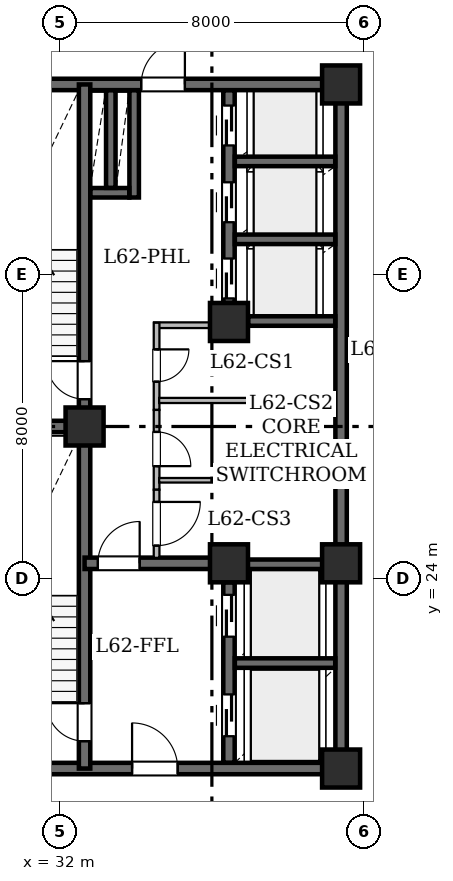
"""IFC4 building model, lengths in metres.
Left out: names, types, materials, properties, quantities, classifications, styles, units other than length and angle.
Written with IfcOpenShell. Run it as: python <this file> out.ifc"""

import sys

from ifc_helpers import new_model, si_unit, direction, frame, frame_2d, origin, origin_2d, place, context, subcontext, project, spatial, rectangle, hollow_rectangle, extrude, element, fill, save


model = new_model("IFC4")
c1 = context("Model", 3, precision=1e-05, world=origin(), true_north=direction((0.0, 1.0)))
c2 = subcontext(c1, "Body", "Model", "MODEL_VIEW")
j1 = project(units=[si_unit("LENGTHUNIT", "METRE"), si_unit("PLANEANGLEUNIT", "RADIAN")], contexts=[c1])
p1 = place(None, origin())
s1 = spatial("IfcSite", under=j1, at=p1, CompositionType="ELEMENT")
p2 = place(p1, origin())
s2 = spatial("IfcBuilding", under=s1, at=p2, CompositionType="ELEMENT")
p3 = place(p2, frame((0.0, 0.0, 242.75)))
s3 = spatial("IfcBuildingStorey", under=s2, at=p3, CompositionType="ELEMENT", Elevation=242.75)
for number, where, z_axis, x_axis in (
    (1, (32.65, 28.0, 0.0), (0.0, 0.0, 1.0), (1.0, 0.0, 0.0)),
    (2, (39.4, 19.0, 0.0), (0.0, 0.0, 1.0), (1.0, 0.0, 0.0)),
    (3, (36.45, 24.4, 0.0), (0.0, 0.0, 1.0), (1.0, 0.0, 0.0)),
    (4, (39.4, 24.4, 0.0), (0.0, 0.0, 1.0), (1.0, 0.0, 0.0)),
    (5, (36.45, 30.75, 0.0), (0.0, 0.0, 1.0), (1.0, 0.0, 0.0)),
    (6, (39.4, 37.0, 0.0), (0.0, 0.0, 1.0), (1.0, 0.0, 0.0)),
):
    element("IfcColumn", number, at=place(p3, frame(where, z_axis=z_axis, x_axis=x_axis)), inside=s3, PredefinedType="COLUMN", context=c2, shape_type="SweptSolid", body=[
        extrude(hollow_rectangle(XDim=1.0, YDim=1.0, WallThickness=0.05, at=origin_2d()), origin(), (0.0, 0.0, 1.0), 3.65),
    ])
p4 = place(p3, frame((29.0, 19.0, 0.0), z_axis=(0.0, 0.0, 1.0), x_axis=(1.0, 0.0, 0.0)))
e7 = element("IfcWall", 7, at=p4, inside=s3, PredefinedType="SHEAR", context=c2, shape_type="SweptSolid", body=[
    extrude(rectangle(XDim=10.4, YDim=0.3, at=frame_2d((5.2, 0.0))), origin(), (0.0, 0.0, 1.0), 3.43),
])
p5 = place(p4, frame((4.9, 0.0, 0.0)))
e8 = element("IfcOpeningElement", 8, at=p5, cuts=e7, PredefinedType="OPENING", context=c2, shape_type="SweptSolid", body=[
    extrude(rectangle(XDim=1.2, YDim=2.15, at=frame_2d((0.6, 1.075))), frame((0.0, 0.16, 0.0), z_axis=(0.0, -1.0, 0.0), x_axis=(1.0, 0.0, 0.0)), (0.0, 0.0, 1.0), 0.32),
])
p6 = place(p3, frame((29.0, 37.0, 0.0), z_axis=(0.0, 0.0, 1.0), x_axis=(1.0, 0.0, 0.0)))
e9 = element("IfcWall", 9, at=p6, inside=s3, PredefinedType="SHEAR", context=c2, shape_type="SweptSolid", body=[
    extrude(rectangle(XDim=10.4, YDim=0.3, at=frame_2d((5.2, 0.0))), origin(), (0.0, 0.0, 1.0), 3.43),
])
p7 = place(p6, frame((5.14, 0.0, 0.0)))
e10 = element("IfcOpeningElement", 10, at=p7, cuts=e9, PredefinedType="OPENING", context=c2, shape_type="SweptSolid", body=[
    extrude(rectangle(XDim=1.15, YDim=2.2, at=frame_2d((0.575, 1.1))), frame((0.0, 0.16, 0.0), z_axis=(0.0, -1.0, 0.0), x_axis=(1.0, 0.0, 0.0)), (0.0, 0.0, 1.0), 0.32),
])
p8 = place(p3, frame((39.4, 19.0, 0.0), z_axis=(0.0, 0.0, 1.0), x_axis=(0.0, 1.0, 0.0)))
e11 = element("IfcWall", 11, at=p8, inside=s3, PredefinedType="SHEAR", context=c2, shape_type="SweptSolid", body=[
    extrude(rectangle(XDim=5.4, YDim=0.3, at=frame_2d((2.7, 0.0))), origin(), (0.0, 0.0, 1.0), 3.43),
])
p9 = place(p3, frame((39.4, 24.4, 0.0), z_axis=(0.0, 0.0, 1.0), x_axis=(0.0, 1.0, 0.0)))
e12 = element("IfcWall", 12, at=p9, inside=s3, PredefinedType="SHEAR", context=c2, shape_type="SweptSolid", body=[
    extrude(rectangle(XDim=12.6, YDim=0.3, at=frame_2d((6.3, 0.0))), origin(), (0.0, 0.0, 1.0), 3.43),
])
p10 = place(p3, frame((32.65, 19.0, 0.0), z_axis=(0.0, 0.0, 1.0), x_axis=(0.0, 1.0, 0.0)))
e13 = element("IfcWall", 13, at=p10, inside=s3, PredefinedType="SHEAR", context=c2, shape_type="SweptSolid", body=[
    extrude(rectangle(XDim=9.0, YDim=0.3, at=frame_2d((4.5, 0.0))), origin(), (0.0, 0.0, 1.0), 3.43),
])
p11 = place(p10, frame((0.72, 0.0, 0.0)))
e14 = element("IfcOpeningElement", 14, at=p11, cuts=e13, PredefinedType="OPENING", context=c2, shape_type="SweptSolid", body=[
    extrude(rectangle(XDim=1.0, YDim=2.15, at=frame_2d((0.5, 1.075))), frame((0.0, 0.16, 0.0), z_axis=(0.0, -1.0, 0.0), x_axis=(1.0, 0.0, 0.0)), (0.0, 0.0, 1.0), 0.32),
])
p12 = place(p3, frame((32.65, 28.0, 0.0), z_axis=(0.0, 0.0, 1.0), x_axis=(0.0, 1.0, 0.0)))
e15 = element("IfcWall", 15, at=p12, inside=s3, PredefinedType="SHEAR", context=c2, shape_type="SweptSolid", body=[
    extrude(rectangle(XDim=9.0, YDim=0.3, at=frame_2d((4.5, 0.0))), origin(), (0.0, 0.0, 1.0), 3.43),
])
p13 = place(p12, frame((0.72, 0.0, 0.0)))
e16 = element("IfcOpeningElement", 16, at=p13, cuts=e15, PredefinedType="OPENING", context=c2, shape_type="SweptSolid", body=[
    extrude(rectangle(XDim=1.0, YDim=2.15, at=frame_2d((0.5, 1.075))), frame((0.0, 0.16, 0.0), z_axis=(0.0, -1.0, 0.0), x_axis=(1.0, 0.0, 0.0)), (0.0, 0.0, 1.0), 0.32),
])
p14 = place(p3, frame((29.0, 28.0, 0.0), z_axis=(0.0, 0.0, 1.0), x_axis=(1.0, 0.0, 0.0)))
e17 = element("IfcWall", 17, at=p14, inside=s3, PredefinedType="SHEAR", context=c2, shape_type="SweptSolid", body=[
    extrude(rectangle(XDim=3.65, YDim=0.3, at=frame_2d((1.825, 0.0))), origin(), (0.0, 0.0, 1.0), 3.43),
])
p15 = place(p3, frame((32.65, 24.4, 0.0), z_axis=(0.0, 0.0, 1.0), x_axis=(1.0, 0.0, 0.0)))
e18 = element("IfcWall", 18, at=p15, inside=s3, PredefinedType="SHEAR", context=c2, shape_type="SweptSolid", body=[
    extrude(rectangle(XDim=3.8, YDim=0.3, at=frame_2d((1.9, 0.0))), origin(), (0.0, 0.0, 1.0), 3.43),
])
p16 = place(p15, frame((0.35, 0.0, 0.0)))
e19 = element("IfcOpeningElement", 19, at=p16, cuts=e18, PredefinedType="OPENING", context=c2, shape_type="SweptSolid", body=[
    extrude(rectangle(XDim=1.1, YDim=2.15, at=frame_2d((0.55, 1.075))), frame((0.0, 0.16, 0.0), z_axis=(0.0, -1.0, 0.0), x_axis=(1.0, 0.0, 0.0)), (0.0, 0.0, 1.0), 0.32),
])
p17 = place(p3, frame((36.45, 19.154, 0.0), z_axis=(0.0, 0.0, 1.0), x_axis=(0.0, 1.0, 0.0)))
e20 = element("IfcWall", 20, at=p17, inside=s3, PredefinedType="SHEAR", context=c2, shape_type="SweptSolid", body=[
    extrude(rectangle(XDim=4.746, YDim=0.3, at=frame_2d((2.373, 0.0))), origin(), (0.0, 0.0, 1.0), 3.43),
])
p18 = place(p17, frame((0.696, 0.0, 0.0)))
e21 = element("IfcOpeningElement", 21, at=p18, cuts=e20, PredefinedType="OPENING", context=c2, shape_type="SweptSolid", body=[
    extrude(rectangle(XDim=1.1, YDim=2.15, at=frame_2d((0.55, 1.075))), frame((0.0, 0.16, 0.0), z_axis=(0.0, -1.0, 0.0), x_axis=(1.0, 0.0, 0.0)), (0.0, 0.0, 1.0), 0.32),
])
p19 = place(p17, frame((3.316, 0.0, 0.0)))
e22 = element("IfcOpeningElement", 22, at=p19, cuts=e20, PredefinedType="OPENING", context=c2, shape_type="SweptSolid", body=[
    extrude(rectangle(XDim=1.1, YDim=2.15, at=frame_2d((0.55, 1.075))), frame((0.0, 0.16, 0.0), z_axis=(0.0, -1.0, 0.0), x_axis=(1.0, 0.0, 0.0)), (0.0, 0.0, 1.0), 0.32),
])
p20 = place(p3, frame((36.45, 31.25, 0.0), z_axis=(0.0, 0.0, 1.0), x_axis=(0.0, 1.0, 0.0)))
e23 = element("IfcWall", 23, at=p20, inside=s3, PredefinedType="SHEAR", context=c2, shape_type="SweptSolid", body=[
    extrude(rectangle(XDim=5.596, YDim=0.3, at=frame_2d((2.798, 0.0))), origin(), (0.0, 0.0, 1.0), 3.43),
])
p21 = place(p20, frame((0.12, 0.0, 0.0)))
e24 = element("IfcOpeningElement", 24, at=p21, cuts=e23, PredefinedType="OPENING", context=c2, shape_type="SweptSolid", body=[
    extrude(rectangle(XDim=1.05, YDim=2.15, at=frame_2d((0.525, 1.075))), frame((0.0, 0.16, 0.0), z_axis=(0.0, -1.0, 0.0), x_axis=(1.0, 0.0, 0.0)), (0.0, 0.0, 1.0), 0.32),
])
p22 = place(p20, frame((2.125, 0.0, 0.0)))
e25 = element("IfcOpeningElement", 25, at=p22, cuts=e23, PredefinedType="OPENING", context=c2, shape_type="SweptSolid", body=[
    extrude(rectangle(XDim=1.05, YDim=2.15, at=frame_2d((0.525, 1.075))), frame((0.0, 0.16, 0.0), z_axis=(0.0, -1.0, 0.0), x_axis=(1.0, 0.0, 0.0)), (0.0, 0.0, 1.0), 0.32),
])
p23 = place(p20, frame((4.145, 0.0, 0.0)))
e26 = element("IfcOpeningElement", 26, at=p23, cuts=e23, PredefinedType="OPENING", context=c2, shape_type="SweptSolid", body=[
    extrude(rectangle(XDim=1.05, YDim=2.15, at=frame_2d((0.525, 1.075))), frame((0.0, 0.16, 0.0), z_axis=(0.0, -1.0, 0.0), x_axis=(1.0, 0.0, 0.0)), (0.0, 0.0, 1.0), 0.32),
])
for number, where, z_axis, x_axis in (
    (27, (36.604, 21.775, 0.0), (0.0, 0.0, 1.0), (1.0, 0.0, 0.0)),
    (28, (36.604, 24.375, 0.0), (0.0, 0.0, 1.0), (1.0, 0.0, 0.0)),
):
    element("IfcWall", number, at=place(p3, frame(where, z_axis=z_axis, x_axis=x_axis)), inside=s3, PredefinedType="SHEAR", context=c2, shape_type="SweptSolid", body=[
        extrude(rectangle(XDim=2.642, YDim=0.25, at=frame_2d((1.321, 0.0))), origin(), (0.0, 0.0, 1.0), 3.43),
    ])
p24 = place(p3, frame((36.954, 30.775, 0.0), z_axis=(0.0, 0.0, 1.0), x_axis=(1.0, 0.0, 0.0)))
e29 = element("IfcWall", 29, at=p24, inside=s3, PredefinedType="SHEAR", context=c2, shape_type="SweptSolid", body=[
    extrude(rectangle(XDim=2.292, YDim=0.25, at=frame_2d((1.146, 0.0))), origin(), (0.0, 0.0, 1.0), 3.43),
])
for number, where, z_axis, x_axis in (
    (30, (36.604, 32.925, 0.0), (0.0, 0.0, 1.0), (1.0, 0.0, 0.0)),
    (31, (36.604, 34.975, 0.0), (0.0, 0.0, 1.0), (1.0, 0.0, 0.0)),
):
    element("IfcWall", number, at=place(p3, frame(where, z_axis=z_axis, x_axis=x_axis)), inside=s3, PredefinedType="SHEAR", context=c2, shape_type="SweptSolid", body=[
        extrude(rectangle(XDim=2.642, YDim=0.25, at=frame_2d((1.321, 0.0))), origin(), (0.0, 0.0, 1.0), 3.43),
    ])
p25 = place(p3, frame((33.955, 34.025, 0.0), z_axis=(0.0, 0.0, 1.0), x_axis=(0.0, 1.0, 0.0)))
e32 = element("IfcWall", 32, at=p25, inside=s3, PredefinedType="SHEAR", context=c2, shape_type="SweptSolid", body=[
    extrude(rectangle(XDim=2.821, YDim=0.25, at=frame_2d((1.411, 0.0))), origin(), (0.0, 0.0, 1.0), 3.43),
])
p26 = place(p3, frame((32.804, 34.15, 0.0), z_axis=(0.0, 0.0, 1.0), x_axis=(1.0, 0.0, 0.0)))
e33 = element("IfcWall", 33, at=p26, inside=s3, PredefinedType="SHEAR", context=c2, shape_type="SweptSolid", body=[
    extrude(rectangle(XDim=1.022, YDim=0.25, at=frame_2d((0.511, 0.0))), origin(), (0.0, 0.0, 1.0), 3.43),
])
p27 = place(p3, frame((33.34, 34.279, 0.0), z_axis=(0.0, 0.0, 1.0), x_axis=(0.0, 1.0, 0.0)))
e34 = element("IfcWall", 34, at=p27, inside=s3, PredefinedType="SHEAR", context=c2, shape_type="SweptSolid", body=[
    extrude(rectangle(XDim=2.567, YDim=0.25, at=frame_2d((1.283, 0.0))), origin(), (0.0, 0.0, 1.0), 3.43),
])
p28 = place(p3, frame((36.3, 30.665, 0.0), z_axis=(0.0, 0.0, 1.0), x_axis=(-1.0, 0.0, 0.0)))
e35 = element("IfcWall", 35, at=p28, inside=s3, PredefinedType="STANDARD", context=c2, shape_type="SweptSolid", body=[
    extrude(rectangle(XDim=1.82, YDim=0.15, at=frame_2d((0.91, 0.0))), origin(), (0.0, 0.0, 1.0), 3.43),
])
p29 = place(p3, frame((34.545, 30.73, 0.0), z_axis=(0.0, 0.0, 1.0), x_axis=(0.0, -1.0, 0.0)))
e36 = element("IfcWall", 36, at=p29, inside=s3, PredefinedType="STANDARD", context=c2, shape_type="SweptSolid", body=[
    extrude(rectangle(XDim=2.294, YDim=0.15, at=frame_2d((1.147, 0.0))), origin(), (0.0, 0.0, 1.0), 3.43),
])
p30 = place(p29, frame((0.701, 0.0, 0.0)))
e37 = element("IfcOpeningElement", 37, at=p30, cuts=e36, PredefinedType="OPENING", context=c2, shape_type="SweptSolid", body=[
    extrude(rectangle(XDim=0.85, YDim=2.1, at=frame_2d((0.425, 1.05))), frame((0.0, 0.085, 0.0), z_axis=(0.0, -1.0, 0.0), x_axis=(1.0, 0.0, 0.0)), (0.0, 0.0, 1.0), 0.17),
])
p31 = place(p3, frame((34.545, 28.436, 0.0), z_axis=(0.0, 0.0, 1.0), x_axis=(0.0, -1.0, 0.0)))
e38 = element("IfcWall", 38, at=p31, inside=s3, PredefinedType="STANDARD", context=c2, shape_type="SweptSolid", body=[
    extrude(rectangle(XDim=2.1, YDim=0.15, at=frame_2d((1.05, 0.0))), origin(), (0.0, 0.0, 1.0), 3.43),
])
p32 = place(p31, frame((0.579, 0.0, 0.0)))
e39 = element("IfcOpeningElement", 39, at=p32, cuts=e38, PredefinedType="OPENING", context=c2, shape_type="SweptSolid", body=[
    extrude(rectangle(XDim=0.9, YDim=2.1, at=frame_2d((0.45, 1.05))), frame((0.0, 0.085, 0.0), z_axis=(0.0, -1.0, 0.0), x_axis=(1.0, 0.0, 0.0)), (0.0, 0.0, 1.0), 0.17),
])
p33 = place(p3, frame((34.545, 26.336, 0.0), z_axis=(0.0, 0.0, 1.0), x_axis=(0.0, -1.0, 0.0)))
e40 = element("IfcWall", 40, at=p33, inside=s3, PredefinedType="STANDARD", context=c2, shape_type="SweptSolid", body=[
    extrude(rectangle(XDim=1.792, YDim=0.15, at=frame_2d((0.896, 0.0))), origin(), (0.0, 0.0, 1.0), 3.43),
])
p34 = place(p33, frame((0.321, 0.0, 0.0)))
e41 = element("IfcOpeningElement", 41, at=p34, cuts=e40, PredefinedType="OPENING", context=c2, shape_type="SweptSolid", body=[
    extrude(rectangle(XDim=1.15, YDim=2.2, at=frame_2d((0.575, 1.1))), frame((0.0, 0.085, 0.0), z_axis=(0.0, -1.0, 0.0), x_axis=(1.0, 0.0, 0.0)), (0.0, 0.0, 1.0), 0.17),
])
p35 = place(p3, frame((39.256, 28.685, 0.0), z_axis=(0.0, 0.0, 1.0), x_axis=(-1.0, 0.0, 0.0)))
e42 = element("IfcWall", 42, at=p35, inside=s3, PredefinedType="PARTITIONING", context=c2, shape_type="SweptSolid", body=[
    extrude(rectangle(XDim=4.644, YDim=0.135, at=frame_2d((2.322, 0.0))), origin(), (0.0, 0.0, 1.0), 3.43),
])
p36 = place(p3, frame((39.256, 26.585, 0.0), z_axis=(0.0, 0.0, 1.0), x_axis=(-1.0, 0.0, 0.0)))
e43 = element("IfcWall", 43, at=p36, inside=s3, PredefinedType="PARTITIONING", context=c2, shape_type="SweptSolid", body=[
    extrude(rectangle(XDim=4.644, YDim=0.12, at=frame_2d((2.322, 0.0))), origin(), (0.0, 0.0, 1.0), 3.43),
])
p37 = place(p11, origin())
e44 = element("IfcDoor", 44, at=p37, inside=s3, OperationType="SINGLE_SWING_RIGHT", PredefinedType="DOOR", context=c2, shape_type="SweptSolid", body=[
    extrude(rectangle(XDim=1.0, YDim=2.15, at=frame_2d((0.5, 1.075))), frame((0.0, 0.025, 0.0), z_axis=(0.0, -1.0, 0.0), x_axis=(1.0, 0.0, 0.0)), (0.0, 0.0, 1.0), 0.05),
])
fill(e14, e44)
p38 = place(p13, origin())
e45 = element("IfcDoor", 45, at=p38, inside=s3, OperationType="SINGLE_SWING_RIGHT", PredefinedType="DOOR", context=c2, shape_type="SweptSolid", body=[
    extrude(rectangle(XDim=1.0, YDim=2.15, at=frame_2d((0.5, 1.075))), frame((0.0, 0.025, 0.0), z_axis=(0.0, -1.0, 0.0), x_axis=(1.0, 0.0, 0.0)), (0.0, 0.0, 1.0), 0.05),
])
fill(e16, e45)
p39 = place(p16, origin())
e46 = element("IfcDoor", 46, at=p39, inside=s3, OperationType="SINGLE_SWING_RIGHT", PredefinedType="DOOR", context=c2, shape_type="SweptSolid", body=[
    extrude(rectangle(XDim=1.1, YDim=2.15, at=frame_2d((0.55, 1.075))), frame((0.0, 0.025, 0.0), z_axis=(0.0, -1.0, 0.0), x_axis=(1.0, 0.0, 0.0)), (0.0, 0.0, 1.0), 0.05),
])
fill(e19, e46)
p40 = place(p5, origin())
e47 = element("IfcDoor", 47, at=p40, inside=s3, OperationType="SINGLE_SWING_LEFT", PredefinedType="DOOR", context=c2, shape_type="SweptSolid", body=[
    extrude(rectangle(XDim=1.2, YDim=2.15, at=frame_2d((0.6, 1.075))), frame((0.0, 0.025, 0.0), z_axis=(0.0, -1.0, 0.0), x_axis=(1.0, 0.0, 0.0)), (0.0, 0.0, 1.0), 0.05),
])
fill(e8, e47)
p41 = place(p7, origin())
e48 = element("IfcDoor", 48, at=p41, inside=s3, OperationType="SINGLE_SWING_RIGHT", PredefinedType="DOOR", context=c2, shape_type="SweptSolid", body=[
    extrude(rectangle(XDim=1.15, YDim=2.2, at=frame_2d((0.575, 1.1))), frame((0.0, 0.025, 0.0), z_axis=(0.0, -1.0, 0.0), x_axis=(1.0, 0.0, 0.0)), (0.0, 0.0, 1.0), 0.05),
])
fill(e10, e48)
p42 = place(p18, origin())
e49 = element("IfcDoor", 49, at=p42, inside=s3, OperationType="SLIDING_TO_LEFT", PredefinedType="DOOR", context=c2, shape_type="SweptSolid", body=[
    extrude(rectangle(XDim=1.1, YDim=2.15, at=frame_2d((0.55, 1.075))), frame((0.0, 0.025, 0.0), z_axis=(0.0, -1.0, 0.0), x_axis=(1.0, 0.0, 0.0)), (0.0, 0.0, 1.0), 0.05),
])
fill(e21, e49)
p43 = place(p19, origin())
e50 = element("IfcDoor", 50, at=p43, inside=s3, OperationType="SLIDING_TO_LEFT", PredefinedType="DOOR", context=c2, shape_type="SweptSolid", body=[
    extrude(rectangle(XDim=1.1, YDim=2.15, at=frame_2d((0.55, 1.075))), frame((0.0, 0.025, 0.0), z_axis=(0.0, -1.0, 0.0), x_axis=(1.0, 0.0, 0.0)), (0.0, 0.0, 1.0), 0.05),
])
fill(e22, e50)
p44 = place(p21, origin())
e51 = element("IfcDoor", 51, at=p44, inside=s3, OperationType="SLIDING_TO_LEFT", PredefinedType="DOOR", context=c2, shape_type="SweptSolid", body=[
    extrude(rectangle(XDim=1.05, YDim=2.15, at=frame_2d((0.525, 1.075))), frame((0.0, 0.025, 0.0), z_axis=(0.0, -1.0, 0.0), x_axis=(1.0, 0.0, 0.0)), (0.0, 0.0, 1.0), 0.05),
])
fill(e24, e51)
p45 = place(p22, origin())
e52 = element("IfcDoor", 52, at=p45, inside=s3, OperationType="SLIDING_TO_LEFT", PredefinedType="DOOR", context=c2, shape_type="SweptSolid", body=[
    extrude(rectangle(XDim=1.05, YDim=2.15, at=frame_2d((0.525, 1.075))), frame((0.0, 0.025, 0.0), z_axis=(0.0, -1.0, 0.0), x_axis=(1.0, 0.0, 0.0)), (0.0, 0.0, 1.0), 0.05),
])
fill(e25, e52)
p46 = place(p23, origin())
e53 = element("IfcDoor", 53, at=p46, inside=s3, OperationType="SLIDING_TO_LEFT", PredefinedType="DOOR", context=c2, shape_type="SweptSolid", body=[
    extrude(rectangle(XDim=1.05, YDim=2.15, at=frame_2d((0.525, 1.075))), frame((0.0, 0.025, 0.0), z_axis=(0.0, -1.0, 0.0), x_axis=(1.0, 0.0, 0.0)), (0.0, 0.0, 1.0), 0.05),
])
fill(e26, e53)
p47 = place(p30, origin())
e54 = element("IfcDoor", 54, at=p47, inside=s3, OperationType="SINGLE_SWING_LEFT", PredefinedType="DOOR", context=c2, shape_type="SweptSolid", body=[
    extrude(rectangle(XDim=0.85, YDim=2.1, at=frame_2d((0.425, 1.05))), frame((0.0, 0.025, 0.0), z_axis=(0.0, -1.0, 0.0), x_axis=(1.0, 0.0, 0.0)), (0.0, 0.0, 1.0), 0.05),
])
fill(e37, e54)
p48 = place(p32, origin())
e55 = element("IfcDoor", 55, at=p48, inside=s3, OperationType="SINGLE_SWING_RIGHT", PredefinedType="DOOR", context=c2, shape_type="SweptSolid", body=[
    extrude(rectangle(XDim=0.9, YDim=2.1, at=frame_2d((0.45, 1.05))), frame((0.0, 0.025, 0.0), z_axis=(0.0, -1.0, 0.0), x_axis=(1.0, 0.0, 0.0)), (0.0, 0.0, 1.0), 0.05),
])
fill(e39, e55)
p49 = place(p34, origin())
e56 = element("IfcDoor", 56, at=p49, inside=s3, OperationType="SINGLE_SWING_LEFT", PredefinedType="DOOR", context=c2, shape_type="SweptSolid", body=[
    extrude(rectangle(XDim=1.15, YDim=2.2, at=frame_2d((0.575, 1.1))), frame((0.0, 0.025, 0.0), z_axis=(0.0, -1.0, 0.0), x_axis=(1.0, 0.0, 0.0)), (0.0, 0.0, 1.0), 0.05),
])
fill(e41, e56)
save(model, sys.argv[1])
